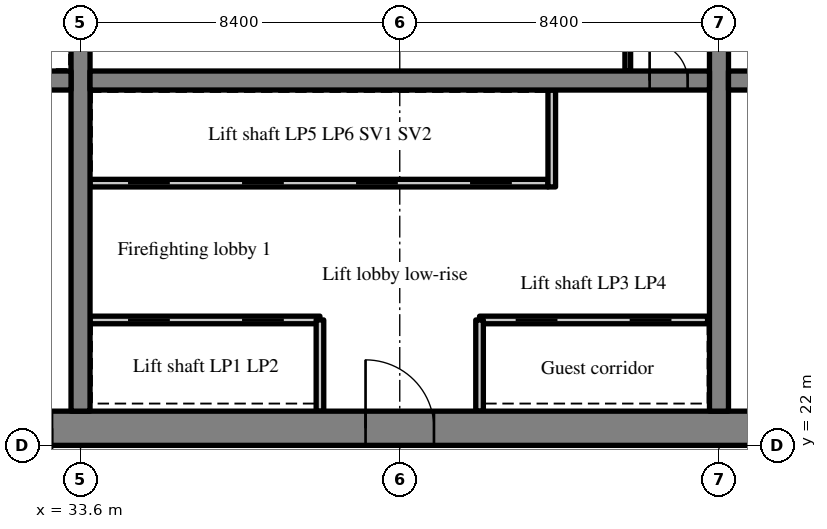
"""IFC4 building model, lengths in metres.
Left out: names, types, materials, properties, quantities, classifications, styles, units other than length and angle.
Written with IfcOpenShell. Run it as: python <this file> out.ifc"""

import sys

from ifc_helpers import new_model, si_unit, direction, frame, frame_2d, origin, place, context, subcontext, project, spatial, rectangle, extrude, source, transform, mapped, element, fill, save


model = new_model("IFC4")
c1 = context("Model", 3, precision=1e-05, world=origin(), true_north=direction((0.0, 1.0)))
c2 = subcontext(c1, "Body", "Model", "MODEL_VIEW")
j1 = project(units=[si_unit("LENGTHUNIT", "METRE"), si_unit("PLANEANGLEUNIT", "RADIAN")], contexts=[c1])
p1 = place(None, origin())
s1 = spatial("IfcSite", under=j1, at=p1, CompositionType="ELEMENT")
p2 = place(p1, origin())
s2 = spatial("IfcBuilding", under=s1, at=p2, CompositionType="ELEMENT")
p3 = place(p2, frame((0.0, 0.0, 129.4)))
s3 = spatial("IfcBuildingStorey", under=s2, at=p3, CompositionType="ELEMENT", Elevation=129.4)
m1 = source(origin(), c2, "Body", "SweptSolid", [
    extrude(rectangle(XDim=50.4, YDim=0.9, at=frame_2d((25.2, 0.0))), origin(), (0.0, 0.0, 1.0), 3.52),
])
p4 = place(p3, frame((25.2, 22.45, 0.0), z_axis=(0.0, 0.0, 1.0), x_axis=(1.0, 0.0, 0.0)))
e1 = element("IfcWall", 1, at=p4, inside=s3, PredefinedType="SHEAR", context=c2, shape_type="MappedRepresentation", body=[
    mapped(m1, transform((0.0, 0.0, 0.0), scale=1.0)),
])
m2 = source(origin(), c2, "Body", "SweptSolid", [
    extrude(rectangle(XDim=1.8, YDim=2.1, at=frame_2d((0.9, 1.05))), frame((0.0, 0.46, 0.0), z_axis=(0.0, -1.0, 0.0), x_axis=(1.0, 0.0, 0.0)), (0.0, 0.0, 1.0), 0.92),
])
p5 = place(p4, frame((15.9, 0.0, 0.0)))
e2 = element("IfcOpeningElement", 2, at=p5, cuts=e1, PredefinedType="OPENING", context=c2, shape_type="MappedRepresentation", body=[
    mapped(m2, transform((0.0, 0.0, 0.0), scale=1.0)),
])
m3 = source(origin(), c2, "Body", "SweptSolid", [
    extrude(rectangle(XDim=1.2, YDim=2.1, at=frame_2d((0.6, 1.05))), frame((0.0, 0.46, 0.0), z_axis=(0.0, -1.0, 0.0), x_axis=(1.0, 0.0, 0.0)), (0.0, 0.0, 1.0), 0.92),
])
p6 = place(p4, frame((26.975, 0.0, 0.0)))
e3 = element("IfcOpeningElement", 3, at=p6, cuts=e1, PredefinedType="OPENING", context=c2, shape_type="MappedRepresentation", body=[
    mapped(m3, transform((0.0, 0.0, 0.0), scale=1.0)),
])
m4 = source(origin(), c2, "Body", "SweptSolid", [
    extrude(rectangle(XDim=0.9, YDim=2.1, at=frame_2d((0.45, 1.05))), frame((0.0, 0.46, 0.0), z_axis=(0.0, -1.0, 0.0), x_axis=(1.0, 0.0, 0.0)), (0.0, 0.0, 1.0), 0.92),
])
p7 = place(p4, frame((33.75, 0.0, 0.0)))
e4 = element("IfcOpeningElement", 4, at=p7, cuts=e1, PredefinedType="OPENING", context=c2, shape_type="MappedRepresentation", body=[
    mapped(m4, transform((0.0, 0.0, 0.0), scale=1.0)),
])
p8 = place(p4, frame((30.75, 0.0, 0.0)))
e5 = element("IfcOpeningElement", 5, at=p8, cuts=e1, PredefinedType="OPENING", context=c2, shape_type="MappedRepresentation", body=[
    mapped(m4, transform((0.0, 0.0, 0.0), scale=1.0)),
])
p9 = place(p4, frame((38.275, 0.0, 0.0)))
e6 = element("IfcOpeningElement", 6, at=p9, cuts=e1, PredefinedType="OPENING", context=c2, shape_type="MappedRepresentation", body=[
    mapped(m4, transform((0.0, 0.0, 0.0), scale=1.0)),
])
p10 = place(p4, frame((6.45, 0.0, 0.0)))
e7 = element("IfcOpeningElement", 7, at=p10, cuts=e1, PredefinedType="OPENING", context=c2, shape_type="MappedRepresentation", body=[
    mapped(m3, transform((0.0, 0.0, 0.0), scale=1.0)),
])
p11 = place(p4, frame((47.775, 0.0, 0.0)))
e8 = element("IfcOpeningElement", 8, at=p11, cuts=e1, PredefinedType="OPENING", context=c2, shape_type="MappedRepresentation", body=[
    mapped(m3, transform((0.0, 0.0, 0.0), scale=1.0)),
])
m5 = source(origin(), c2, "Body", "SweptSolid", [
    extrude(rectangle(XDim=18.2, YDim=0.5, at=frame_2d((9.1, 0.0))), origin(), (0.0, 0.0, 1.0), 3.52),
])
p12 = place(p3, frame((33.6, 22.9, 0.0), z_axis=(0.0, 0.0, 1.0), x_axis=(0.0, 1.0, 0.0)))
e9 = element("IfcWall", 9, at=p12, inside=s3, PredefinedType="SHEAR", context=c2, shape_type="MappedRepresentation", body=[
    mapped(m5, transform((0.0, 0.0, 0.0), scale=1.0)),
])
m6 = source(origin(), c2, "Body", "SweptSolid", [
    extrude(rectangle(XDim=1.1, YDim=2.1, at=frame_2d((0.55, 1.05))), frame((0.0, 0.26, 0.0), z_axis=(0.0, -1.0, 0.0), x_axis=(1.0, 0.0, 0.0)), (0.0, 0.0, 1.0), 0.52),
])
p13 = place(p12, frame((12.55, 0.0, 0.0)))
e10 = element("IfcOpeningElement", 10, at=p13, cuts=e9, PredefinedType="OPENING", context=c2, shape_type="MappedRepresentation", body=[
    mapped(m6, transform((0.0, 0.0, 0.0), scale=1.0)),
])
p14 = place(p3, frame((50.4, 22.9, 0.0), z_axis=(0.0, 0.0, 1.0), x_axis=(0.0, 1.0, 0.0)))
e11 = element("IfcWall", 11, at=p14, inside=s3, PredefinedType="SHEAR", context=c2, shape_type="MappedRepresentation", body=[
    mapped(m5, transform((0.0, 0.0, 0.0), scale=1.0)),
])
p15 = place(p14, frame((12.55, 0.0, 0.0)))
e12 = element("IfcOpeningElement", 12, at=p15, cuts=e11, PredefinedType="OPENING", context=c2, shape_type="MappedRepresentation", body=[
    mapped(m6, transform((0.0, 0.0, 0.0), scale=1.0)),
])
m7 = source(origin(), c2, "Body", "SweptSolid", [
    extrude(rectangle(XDim=7.25, YDim=0.5, at=frame_2d((3.625, 0.0))), origin(), (0.0, 0.0, 1.0), 3.52),
])
p16 = place(p3, frame((26.1, 31.6, 0.0), z_axis=(0.0, 0.0, 1.0), x_axis=(1.0, 0.0, 0.0)))
e13 = element("IfcWall", 13, at=p16, inside=s3, PredefinedType="SHEAR", context=c2, shape_type="MappedRepresentation", body=[
    mapped(m7, transform((0.0, 0.0, 0.0), scale=1.0)),
])
p17 = place(p16, frame((5.6, 0.0, 0.0)))
e14 = element("IfcOpeningElement", 14, at=p17, cuts=e13, PredefinedType="OPENING", context=c2, shape_type="MappedRepresentation", body=[
    mapped(m6, transform((0.0, 0.0, 0.0), scale=1.0)),
])
m8 = source(origin(), c2, "Body", "SweptSolid", [
    extrude(rectangle(XDim=16.3, YDim=0.5, at=frame_2d((8.15, 0.0))), origin(), (0.0, 0.0, 1.0), 3.52),
])
p18 = place(p3, frame((33.85, 31.6, 0.0), z_axis=(0.0, 0.0, 1.0), x_axis=(1.0, 0.0, 0.0)))
e15 = element("IfcWall", 15, at=p18, inside=s3, PredefinedType="SHEAR", context=c2, shape_type="MappedRepresentation", body=[
    mapped(m8, transform((0.0, 0.0, 0.0), scale=1.0)),
])
m9 = source(origin(), c2, "Body", "SweptSolid", [
    extrude(rectangle(XDim=1.0, YDim=2.1, at=frame_2d((0.5, 1.05))), frame((0.0, 0.26, 0.0), z_axis=(0.0, -1.0, 0.0), x_axis=(1.0, 0.0, 0.0)), (0.0, 0.0, 1.0), 0.52),
])
p19 = place(p18, frame((14.725, 0.0, 0.0)))
e16 = element("IfcOpeningElement", 16, at=p19, cuts=e15, PredefinedType="OPENING", context=c2, shape_type="MappedRepresentation", body=[
    mapped(m9, transform((0.0, 0.0, 0.0), scale=1.0)),
])
m10 = source(origin(), c2, "Body", "SweptSolid", [
    extrude(rectangle(XDim=16.3, YDim=0.5, at=frame_2d((8.15, 0.0))), origin(), (0.0, 0.0, 1.0), 3.52),
])
p20 = place(p3, frame((50.65, 31.6, 0.0), z_axis=(0.0, 0.0, 1.0), x_axis=(1.0, 0.0, 0.0)))
e17 = element("IfcWall", 17, at=p20, inside=s3, PredefinedType="SHEAR", context=c2, shape_type="MappedRepresentation", body=[
    mapped(m10, transform((0.0, 0.0, 0.0), scale=1.0)),
])
p21 = place(p20, frame((0.575, 0.0, 0.0)))
e18 = element("IfcOpeningElement", 18, at=p21, cuts=e17, PredefinedType="OPENING", context=c2, shape_type="MappedRepresentation", body=[
    mapped(m9, transform((0.0, 0.0, 0.0), scale=1.0)),
])
m11 = source(origin(), c2, "Body", "SweptSolid", [
    extrude(rectangle(XDim=6.05, YDim=0.2, at=frame_2d((3.025, 0.0))), origin(), (0.0, 0.0, 1.0), 3.52),
])
p22 = place(p3, frame((33.85, 25.3, 0.0), z_axis=(0.0, 0.0, 1.0), x_axis=(1.0, 0.0, 0.0)))
e19 = element("IfcWall", 19, at=p22, inside=s3, PredefinedType="SOLIDWALL", context=c2, shape_type="MappedRepresentation", body=[
    mapped(m11, transform((0.0, 0.0, 0.0), scale=1.0)),
])
m12 = source(origin(), c2, "Body", "SweptSolid", [
    extrude(rectangle(XDim=1.1, YDim=2.1, at=frame_2d((0.55, 1.05))), frame((0.0, 0.11, 0.0), z_axis=(0.0, -1.0, 0.0), x_axis=(1.0, 0.0, 0.0)), (0.0, 0.0, 1.0), 0.22),
])
p23 = place(p22, frame((1.0, 0.0, 0.0)))
e20 = element("IfcOpeningElement", 20, at=p23, cuts=e19, PredefinedType="OPENING", context=c2, shape_type="MappedRepresentation", body=[
    mapped(m12, transform((0.0, 0.0, 0.0), scale=1.0)),
])
p24 = place(p22, frame((4.0, 0.0, 0.0)))
e21 = element("IfcOpeningElement", 21, at=p24, cuts=e19, PredefinedType="OPENING", context=c2, shape_type="MappedRepresentation", body=[
    mapped(m12, transform((0.0, 0.0, 0.0), scale=1.0)),
])
m13 = source(origin(), c2, "Body", "SweptSolid", [
    extrude(rectangle(XDim=6.0, YDim=0.2, at=frame_2d((3.0, 0.0))), origin(), (0.0, 0.0, 1.0), 3.52),
])
p25 = place(p3, frame((44.1, 25.3, 0.0), z_axis=(0.0, 0.0, 1.0), x_axis=(1.0, 0.0, 0.0)))
e22 = element("IfcWall", 22, at=p25, inside=s3, PredefinedType="SOLIDWALL", context=c2, shape_type="MappedRepresentation", body=[
    mapped(m13, transform((0.0, 0.0, 0.0), scale=1.0)),
])
p26 = place(p25, frame((0.95, 0.0, 0.0)))
e23 = element("IfcOpeningElement", 23, at=p26, cuts=e22, PredefinedType="OPENING", context=c2, shape_type="MappedRepresentation", body=[
    mapped(m12, transform((0.0, 0.0, 0.0), scale=1.0)),
])
p27 = place(p25, frame((3.95, 0.0, 0.0)))
e24 = element("IfcOpeningElement", 24, at=p27, cuts=e22, PredefinedType="OPENING", context=c2, shape_type="MappedRepresentation", body=[
    mapped(m12, transform((0.0, 0.0, 0.0), scale=1.0)),
])
m14 = source(origin(), c2, "Body", "SweptSolid", [
    extrude(rectangle(XDim=12.05, YDim=0.2, at=frame_2d((6.025, 0.0))), origin(), (0.0, 0.0, 1.0), 3.52),
])
p28 = place(p3, frame((33.85, 28.9, 0.0), z_axis=(0.0, 0.0, 1.0), x_axis=(1.0, 0.0, 0.0)))
e25 = element("IfcWall", 25, at=p28, inside=s3, PredefinedType="SOLIDWALL", context=c2, shape_type="MappedRepresentation", body=[
    mapped(m14, transform((0.0, 0.0, 0.0), scale=1.0)),
])
p29 = place(p28, frame((1.0, 0.0, 0.0)))
e26 = element("IfcOpeningElement", 26, at=p29, cuts=e25, PredefinedType="OPENING", context=c2, shape_type="MappedRepresentation", body=[
    mapped(m12, transform((0.0, 0.0, 0.0), scale=1.0)),
])
p30 = place(p28, frame((4.0, 0.0, 0.0)))
e27 = element("IfcOpeningElement", 27, at=p30, cuts=e25, PredefinedType="OPENING", context=c2, shape_type="MappedRepresentation", body=[
    mapped(m12, transform((0.0, 0.0, 0.0), scale=1.0)),
])
p31 = place(p28, frame((7.0, 0.0, 0.0)))
e28 = element("IfcOpeningElement", 28, at=p31, cuts=e25, PredefinedType="OPENING", context=c2, shape_type="MappedRepresentation", body=[
    mapped(m12, transform((0.0, 0.0, 0.0), scale=1.0)),
])
p32 = place(p28, frame((10.0, 0.0, 0.0)))
e29 = element("IfcOpeningElement", 29, at=p32, cuts=e25, PredefinedType="OPENING", context=c2, shape_type="MappedRepresentation", body=[
    mapped(m12, transform((0.0, 0.0, 0.0), scale=1.0)),
])
m15 = source(origin(), c2, "Body", "SweptSolid", [
    extrude(rectangle(XDim=2.4, YDim=0.2, at=frame_2d((1.2, 0.0))), origin(), (0.0, 0.0, 1.0), 3.52),
])
for number, where, z_axis, x_axis in (
    (30, (39.9, 22.9, 0.0), (0.0, 0.0, 1.0), (0.0, 1.0, 0.0)),
    (31, (44.1, 22.9, 0.0), (0.0, 0.0, 1.0), (0.0, 1.0, 0.0)),
):
    element("IfcWall", number, at=place(p3, frame(where, z_axis=z_axis, x_axis=x_axis)), inside=s3, PredefinedType="SOLIDWALL", context=c2, shape_type="MappedRepresentation", body=[
        mapped(m15, transform((0.0, 0.0, 0.0), scale=1.0)),
    ])
m16 = source(origin(), c2, "Body", "SweptSolid", [
    extrude(rectangle(XDim=2.55, YDim=0.2, at=frame_2d((1.275, 0.0))), origin(), (0.0, 0.0, 1.0), 3.52),
])
p33 = place(p3, frame((46.0, 28.8, 0.0), z_axis=(0.0, 0.0, 1.0), x_axis=(0.0, 1.0, 0.0)))
e32 = element("IfcWall", 32, at=p33, inside=s3, PredefinedType="SOLIDWALL", context=c2, shape_type="MappedRepresentation", body=[
    mapped(m16, transform((0.0, 0.0, 0.0), scale=1.0)),
])
m17 = source(origin(), c2, "Body", "SweptSolid", [
    extrude(rectangle(XDim=3.15, YDim=0.15, at=frame_2d((1.575, 0.0))), origin(), (0.0, 0.0, 1.0), 3.52),
])
p34 = place(p3, frame((48.0, 31.85, 0.0), z_axis=(0.0, 0.0, 1.0), x_axis=(0.0, 1.0, 0.0)))
e33 = element("IfcWall", 33, at=p34, inside=s3, PredefinedType="PARTITIONING", context=c2, shape_type="MappedRepresentation", body=[
    mapped(m17, transform((0.0, 0.0, 0.0), scale=1.0)),
])
m18 = source(origin(), c2, "Body", "SweptSolid", [
    extrude(rectangle(XDim=1.8, YDim=2.1, at=frame_2d((0.9, 1.05))), frame((0.0, 0.375, 0.0), z_axis=(0.0, -1.0, 0.0), x_axis=(1.0, 0.0, 0.0)), (0.0, 0.0, 1.0), 0.05),
])
p35 = place(p5, origin())
e34 = element("IfcDoor", 34, at=p35, inside=s3, OperationType="DOUBLE_DOOR_SINGLE_SWING", PredefinedType="DOOR", context=c2, shape_type="MappedRepresentation", body=[
    mapped(m18, transform((0.0, 0.0, 0.0), scale=1.0)),
])
fill(e2, e34)
m19 = source(origin(), c2, "Body", "SweptSolid", [
    extrude(rectangle(XDim=1.0, YDim=2.1, at=frame_2d((0.5, 1.05))), frame((0.0, 0.025, 0.0), z_axis=(0.0, -1.0, 0.0), x_axis=(1.0, 0.0, 0.0)), (0.0, 0.0, 1.0), 0.05),
])
p36 = place(p19, origin())
e35 = element("IfcDoor", 35, at=p36, inside=s3, OperationType="SINGLE_SWING_LEFT", PredefinedType="DOOR", context=c2, shape_type="MappedRepresentation", body=[
    mapped(m19, transform((0.0, 0.0, 0.0), scale=1.0)),
])
fill(e16, e35)
m20 = source(origin(), c2, "Body", "SweptSolid", [
    extrude(rectangle(XDim=1.1, YDim=2.1, at=frame_2d((0.55, 1.05))), frame((0.0, 0.025, 0.0), z_axis=(0.0, -1.0, 0.0), x_axis=(1.0, 0.0, 0.0)), (0.0, 0.0, 1.0), 0.05),
])
p37 = place(p23, origin())
e36 = element("IfcDoor", 36, at=p37, inside=s3, OperationType="SLIDING_TO_LEFT", PredefinedType="DOOR", context=c2, shape_type="MappedRepresentation", body=[
    mapped(m20, transform((0.0, 0.0, 0.0), scale=1.0)),
])
fill(e20, e36)
p38 = place(p24, origin())
e37 = element("IfcDoor", 37, at=p38, inside=s3, OperationType="SLIDING_TO_RIGHT", PredefinedType="DOOR", context=c2, shape_type="MappedRepresentation", body=[
    mapped(m20, transform((0.0, 0.0, 0.0), scale=1.0)),
])
fill(e21, e37)
p39 = place(p26, origin())
e38 = element("IfcDoor", 38, at=p39, inside=s3, OperationType="SLIDING_TO_LEFT", PredefinedType="DOOR", context=c2, shape_type="MappedRepresentation", body=[
    mapped(m20, transform((0.0, 0.0, 0.0), scale=1.0)),
])
fill(e23, e38)
p40 = place(p27, origin())
e39 = element("IfcDoor", 39, at=p40, inside=s3, OperationType="SLIDING_TO_RIGHT", PredefinedType="DOOR", context=c2, shape_type="MappedRepresentation", body=[
    mapped(m20, transform((0.0, 0.0, 0.0), scale=1.0)),
])
fill(e24, e39)
p41 = place(p29, origin())
e40 = element("IfcDoor", 40, at=p41, inside=s3, OperationType="SLIDING_TO_LEFT", PredefinedType="DOOR", context=c2, shape_type="MappedRepresentation", body=[
    mapped(m20, transform((0.0, 0.0, 0.0), scale=1.0)),
])
fill(e26, e40)
p42 = place(p30, origin())
e41 = element("IfcDoor", 41, at=p42, inside=s3, OperationType="SLIDING_TO_RIGHT", PredefinedType="DOOR", context=c2, shape_type="MappedRepresentation", body=[
    mapped(m20, transform((0.0, 0.0, 0.0), scale=1.0)),
])
fill(e27, e41)
p43 = place(p31, origin())
e42 = element("IfcDoor", 42, at=p43, inside=s3, OperationType="SLIDING_TO_LEFT", PredefinedType="DOOR", context=c2, shape_type="MappedRepresentation", body=[
    mapped(m20, transform((0.0, 0.0, 0.0), scale=1.0)),
])
fill(e28, e42)
p44 = place(p32, origin())
e43 = element("IfcDoor", 43, at=p44, inside=s3, OperationType="SLIDING_TO_RIGHT", PredefinedType="DOOR", context=c2, shape_type="MappedRepresentation", body=[
    mapped(m20, transform((0.0, 0.0, 0.0), scale=1.0)),
])
fill(e29, e43)
save(model, sys.argv[1])
